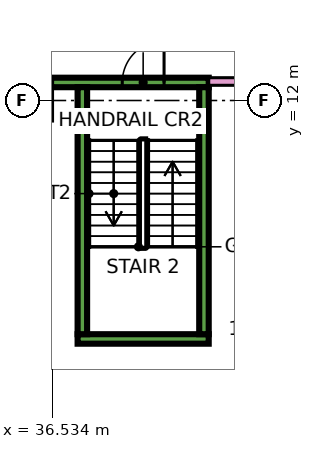
"""IFC4 building model, lengths in metres.
Left out: names, types, materials, properties, quantities, classifications, styles, units other than length and angle.
Written with IfcOpenShell. Run it as: python <this file> out.ifc"""

import sys

from ifc_helpers import new_model, si_unit, direction, frame, frame_2d, origin, place, context, subcontext, project, spatial, rectangle, extrude, element, fill, save


model = new_model("IFC4")
c1 = context("Model", 3, precision=1e-05, world=origin(), true_north=direction((0.0, 1.0)))
c2 = subcontext(c1, "Body", "Model", "MODEL_VIEW")
j1 = project(units=[si_unit("LENGTHUNIT", "METRE"), si_unit("PLANEANGLEUNIT", "RADIAN")], contexts=[c1])
p1 = place(None, origin())
s1 = spatial("IfcSite", under=j1, at=p1, CompositionType="ELEMENT")
p2 = place(p1, origin())
s2 = spatial("IfcBuilding", under=s1, at=p2, CompositionType="ELEMENT")
p3 = place(p2, frame((0.0, 0.0, 114.4)))
s3 = spatial("IfcBuildingStorey", under=s2, at=p3, CompositionType="ELEMENT", Elevation=114.4)
p4 = place(p3, frame((37.2, 5.725, 0.0), z_axis=(0.0, 0.0, 1.0), x_axis=(1.0, 0.0, 0.0)))
e1 = element("IfcWall", 1, at=p4, inside=s3, PredefinedType="SHEAR", context=c2, shape_type="SweptSolid", body=[
    extrude(rectangle(XDim=3.45, YDim=0.25, at=frame_2d((1.725, 0.0))), origin(), (0.0, 0.0, 1.0), 3.75),
])
p5 = place(p3, frame((36.5, 12.475, 0.0), z_axis=(0.0, 0.0, 1.0), x_axis=(1.0, 0.0, 0.0)))
e2 = element("IfcWall", 2, at=p5, inside=s3, PredefinedType="SHEAR", context=c2, shape_type="SweptSolid", body=[
    extrude(rectangle(XDim=4.15, YDim=0.25, at=frame_2d((2.075, 0.0))), origin(), (0.0, 0.0, 1.0), 3.75),
])
p6 = place(p5, frame((1.875, 0.0, 0.0)))
e3 = element("IfcOpeningElement", 3, at=p6, cuts=e2, PredefinedType="OPENING", context=c2, shape_type="SweptSolid", body=[
    extrude(rectangle(XDim=1.1, YDim=2.2, at=frame_2d((0.55, 1.1))), frame((0.0, 0.135, 0.0), z_axis=(0.0, -1.0, 0.0), x_axis=(1.0, 0.0, 0.0)), (0.0, 0.0, 1.0), 0.27),
])
for number, where, z_axis, x_axis in (
    (4, (37.325, 5.85, 0.0), (0.0, 0.0, 1.0), (0.0, 1.0, 0.0)),
    (5, (40.525, 5.85, 0.0), (0.0, 0.0, 1.0), (0.0, 1.0, 0.0)),
):
    element("IfcWall", number, at=place(p3, frame(where, z_axis=z_axis, x_axis=x_axis)), inside=s3, PredefinedType="SHEAR", context=c2, shape_type="SweptSolid", body=[
        extrude(rectangle(XDim=6.5, YDim=0.25, at=frame_2d((3.25, 0.0))), origin(), (0.0, 0.0, 1.0), 3.75),
    ])
p7 = place(p3, frame((40.65, 12.5, 0.0), z_axis=(0.0, 0.0, 1.0), x_axis=(1.0, 0.0, 0.0)))
e6 = element("IfcWall", 6, at=p7, inside=s3, PredefinedType="PARTITIONING", context=c2, shape_type="SweptSolid", body=[
    extrude(rectangle(XDim=31.276, YDim=0.2, at=frame_2d((15.638, 0.0))), origin(), (0.0, 0.0, 1.0), 3.35),
])
p8 = place(p7, frame((20.7, 0.0, 0.0)))
e7 = element("IfcOpeningElement", 7, at=p8, cuts=e6, PredefinedType="OPENING", context=c2, shape_type="SweptSolid", body=[
    extrude(rectangle(XDim=1.0, YDim=2.1, at=frame_2d((0.5, 1.05))), frame((0.0, 0.11, 0.0), z_axis=(0.0, -1.0, 0.0), x_axis=(1.0, 0.0, 0.0)), (0.0, 0.0, 1.0), 0.22),
])
p9 = place(p7, frame((1.05, 0.0, 0.0)))
e8 = element("IfcOpeningElement", 8, at=p9, cuts=e6, PredefinedType="OPENING", context=c2, shape_type="SweptSolid", body=[
    extrude(rectangle(XDim=1.0, YDim=2.1, at=frame_2d((0.5, 1.05))), frame((0.0, 0.11, 0.0), z_axis=(0.0, -1.0, 0.0), x_axis=(1.0, 0.0, 0.0)), (0.0, 0.0, 1.0), 0.22),
])
p10 = place(p6, frame((1.1, 0.0, 0.0), z_axis=(0.0, 0.0, 1.0), x_axis=(-1.0, 0.0, 0.0)))
e9 = element("IfcDoor", 9, at=p10, inside=s3, OperationType="SINGLE_SWING_RIGHT", PredefinedType="DOOR", context=c2, shape_type="SweptSolid", body=[
    extrude(rectangle(XDim=1.1, YDim=2.2, at=frame_2d((0.55, 1.1))), frame((0.0, 0.025, 0.0), z_axis=(0.0, -1.0, 0.0), x_axis=(1.0, 0.0, 0.0)), (0.0, 0.0, 1.0), 0.05),
])
fill(e3, e9)
save(model, sys.argv[1])
